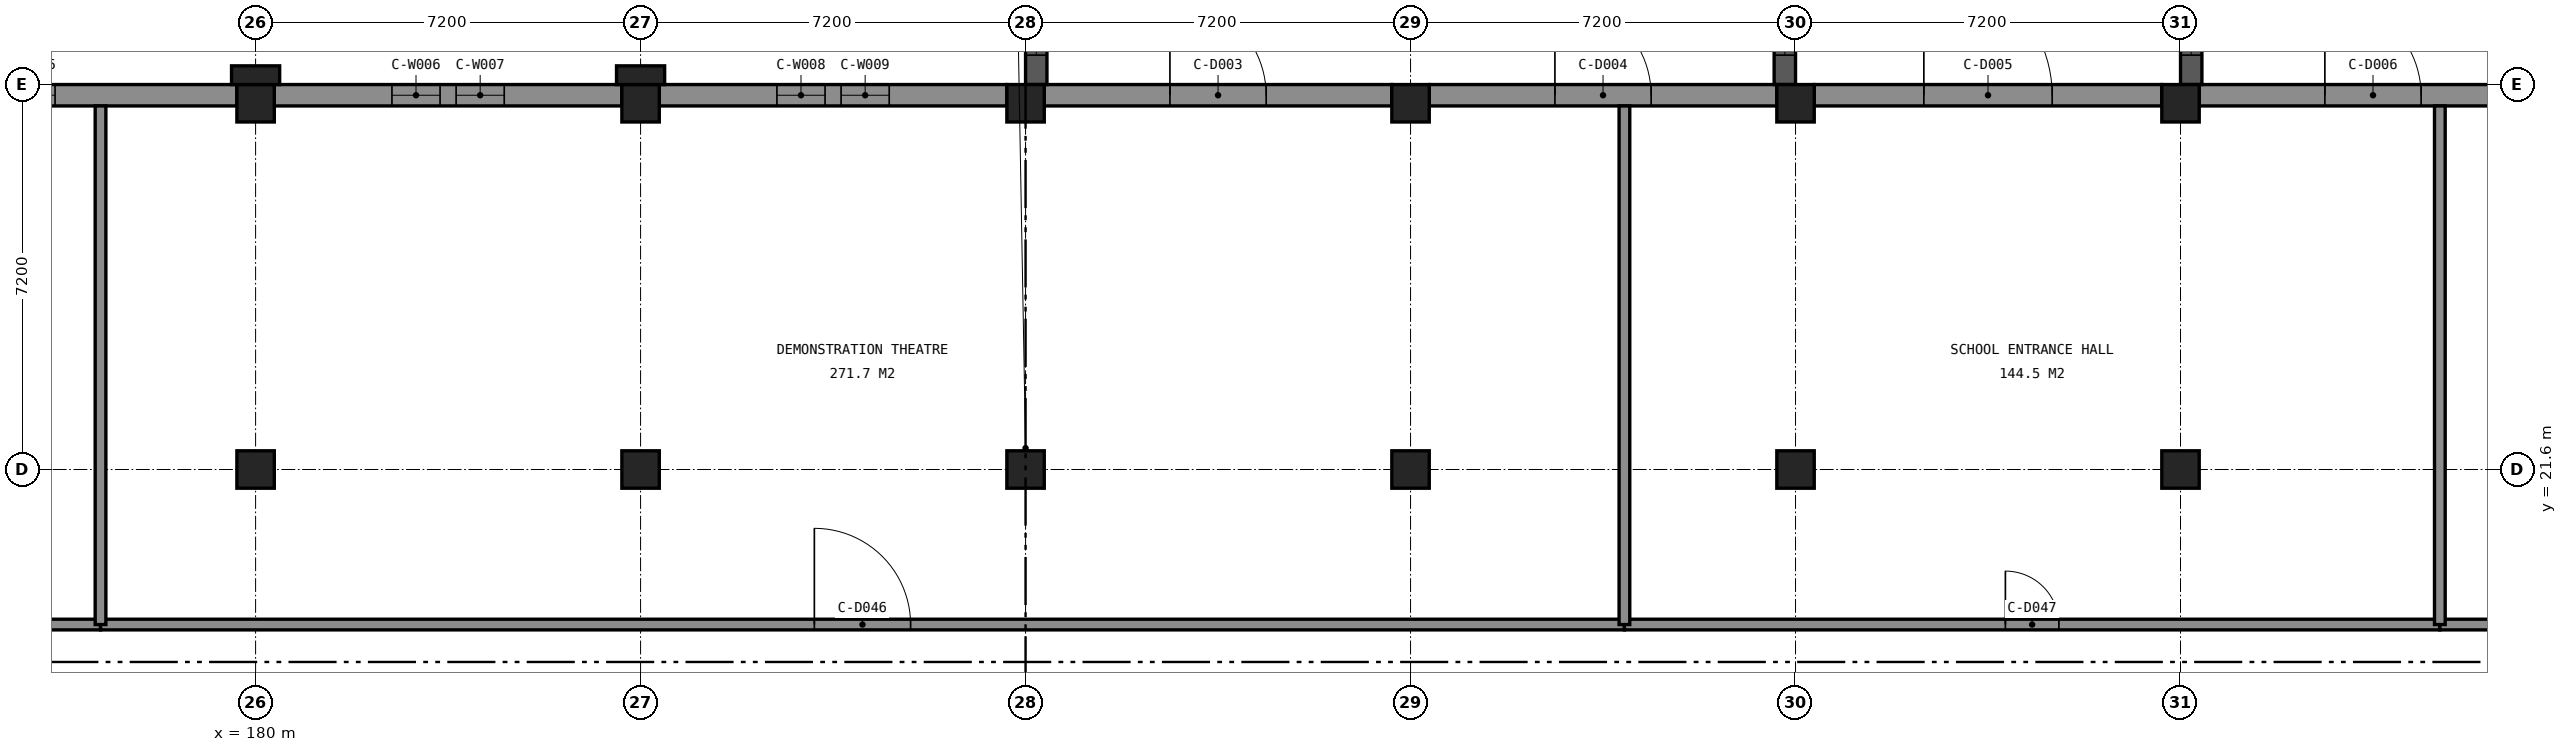
"""IFC4 building model, lengths in metres.
Left out: names, types, materials, properties, quantities, classifications, styles, units other than length and angle.
Written with IfcOpenShell. Run it as: python <this file> out.ifc"""

import sys

from ifc_helpers import new_model, si_unit, direction, frame, frame_2d, origin, origin_2d, place, context, subcontext, project, spatial, rectangle, extrude, element, fill, save


model = new_model("IFC4")
c1 = context("Model", 3, precision=1e-05, world=origin(), true_north=direction((0.0, 1.0)))
c2 = subcontext(c1, "Body", "Model", "MODEL_VIEW")
j1 = project(units=[si_unit("LENGTHUNIT", "METRE"), si_unit("PLANEANGLEUNIT", "RADIAN")], contexts=[c1])
p1 = place(None, origin())
s1 = spatial("IfcSite", under=j1, at=p1, CompositionType="ELEMENT")
p2 = place(p1, origin())
s2 = spatial("IfcBuilding", under=s1, at=p2, CompositionType="ELEMENT")
p3 = place(p2, frame((0.0, 0.0, 4.8)))
s3 = spatial("IfcBuildingStorey", under=s2, at=p3, CompositionType="ELEMENT", Elevation=4.8)
for number, where, z_axis, x_axis in (
    (1, (180.0, 28.45, 0.0), (0.0, 0.0, 1.0), (1.0, 0.0, 0.0)),
    (2, (187.2, 28.45, 0.0), (0.0, 0.0, 1.0), (1.0, 0.0, 0.0)),
    (3, (194.4, 28.45, 0.0), (0.0, 0.0, 1.0), (1.0, 0.0, 0.0)),
    (4, (201.6, 28.45, 0.0), (0.0, 0.0, 1.0), (1.0, 0.0, 0.0)),
    (5, (208.8, 28.45, 0.0), (0.0, 0.0, 1.0), (1.0, 0.0, 0.0)),
    (6, (216.0, 28.45, 0.0), (0.0, 0.0, 1.0), (1.0, 0.0, 0.0)),
    (7, (180.0, 21.6, 0.0), (0.0, 0.0, 1.0), (1.0, 0.0, 0.0)),
    (8, (187.2, 21.6, 0.0), (0.0, 0.0, 1.0), (1.0, 0.0, 0.0)),
    (9, (194.4, 21.6, 0.0), (0.0, 0.0, 1.0), (1.0, 0.0, 0.0)),
    (10, (201.6, 21.6, 0.0), (0.0, 0.0, 1.0), (1.0, 0.0, 0.0)),
    (11, (208.8, 21.6, 0.0), (0.0, 0.0, 1.0), (1.0, 0.0, 0.0)),
    (12, (216.0, 21.6, 0.0), (0.0, 0.0, 1.0), (1.0, 0.0, 0.0)),
):
    element("IfcColumn", number, at=place(p3, frame(where, z_axis=z_axis, x_axis=x_axis)), inside=s3, PredefinedType="COLUMN", context=c2, shape_type="SweptSolid", body=[
        extrude(rectangle(XDim=0.7, YDim=0.7, at=origin_2d()), origin(), (0.0, 0.0, 1.0), 4.8),
    ])
p4 = place(p3, frame((173.15, 28.6, 0.0), z_axis=(0.0, 0.0, 1.0), x_axis=(1.0, 0.0, 0.0)))
e13 = element("IfcWall", 13, at=p4, inside=s3, PredefinedType="SOLIDWALL", context=c2, shape_type="SweptSolid", body=[
    extrude(rectangle(XDim=6.5, YDim=0.4, at=frame_2d((3.25, 0.0))), origin(), (0.0, 0.0, 1.0), 3.95),
])
p5 = place(p4, frame((2.2, 0.0, 1.0)))
e14 = element("IfcOpeningElement", 14, at=p5, cuts=e13, PredefinedType="OPENING", context=c2, shape_type="SweptSolid", body=[
    extrude(rectangle(XDim=0.9, YDim=2.1, at=frame_2d((0.45, 1.05))), frame((0.0, 0.21, 0.0), z_axis=(0.0, -1.0, 0.0), x_axis=(1.0, 0.0, 0.0)), (0.0, 0.0, 1.0), 0.42),
])
p6 = place(p3, frame((180.35, 28.6, 0.0), z_axis=(0.0, 0.0, 1.0), x_axis=(1.0, 0.0, 0.0)))
e15 = element("IfcWall", 15, at=p6, inside=s3, PredefinedType="SOLIDWALL", context=c2, shape_type="SweptSolid", body=[
    extrude(rectangle(XDim=6.5, YDim=0.4, at=frame_2d((3.25, 0.0))), origin(), (0.0, 0.0, 1.0), 3.95),
])
p7 = place(p6, frame((2.2, 0.0, 1.0)))
e16 = element("IfcOpeningElement", 16, at=p7, cuts=e15, PredefinedType="OPENING", context=c2, shape_type="SweptSolid", body=[
    extrude(rectangle(XDim=0.9, YDim=2.1, at=frame_2d((0.45, 1.05))), frame((0.0, 0.21, 0.0), z_axis=(0.0, -1.0, 0.0), x_axis=(1.0, 0.0, 0.0)), (0.0, 0.0, 1.0), 0.42),
])
p8 = place(p6, frame((3.4, 0.0, 1.0)))
e17 = element("IfcOpeningElement", 17, at=p8, cuts=e15, PredefinedType="OPENING", context=c2, shape_type="SweptSolid", body=[
    extrude(rectangle(XDim=0.9, YDim=2.1, at=frame_2d((0.45, 1.05))), frame((0.0, 0.21, 0.0), z_axis=(0.0, -1.0, 0.0), x_axis=(1.0, 0.0, 0.0)), (0.0, 0.0, 1.0), 0.42),
])
p9 = place(p3, frame((187.55, 28.6, 0.0), z_axis=(0.0, 0.0, 1.0), x_axis=(1.0, 0.0, 0.0)))
e18 = element("IfcWall", 18, at=p9, inside=s3, PredefinedType="SOLIDWALL", context=c2, shape_type="SweptSolid", body=[
    extrude(rectangle(XDim=6.5, YDim=0.4, at=frame_2d((3.25, 0.0))), origin(), (0.0, 0.0, 1.0), 3.95),
])
p10 = place(p9, frame((2.2, 0.0, 1.0)))
e19 = element("IfcOpeningElement", 19, at=p10, cuts=e18, PredefinedType="OPENING", context=c2, shape_type="SweptSolid", body=[
    extrude(rectangle(XDim=0.9, YDim=2.1, at=frame_2d((0.45, 1.05))), frame((0.0, 0.21, 0.0), z_axis=(0.0, -1.0, 0.0), x_axis=(1.0, 0.0, 0.0)), (0.0, 0.0, 1.0), 0.42),
])
p11 = place(p9, frame((3.4, 0.0, 1.0)))
e20 = element("IfcOpeningElement", 20, at=p11, cuts=e18, PredefinedType="OPENING", context=c2, shape_type="SweptSolid", body=[
    extrude(rectangle(XDim=0.9, YDim=2.1, at=frame_2d((0.45, 1.05))), frame((0.0, 0.21, 0.0), z_axis=(0.0, -1.0, 0.0), x_axis=(1.0, 0.0, 0.0)), (0.0, 0.0, 1.0), 0.42),
])
p12 = place(p3, frame((194.75, 28.6, 0.0), z_axis=(0.0, 0.0, 1.0), x_axis=(1.0, 0.0, 0.0)))
e21 = element("IfcWall", 21, at=p12, inside=s3, PredefinedType="SOLIDWALL", context=c2, shape_type="SweptSolid", body=[
    extrude(rectangle(XDim=6.5, YDim=0.4, at=frame_2d((3.25, 0.0))), origin(), (0.0, 0.0, 1.0), 3.95),
])
p13 = place(p12, frame((2.35, 0.0, 0.0)))
e22 = element("IfcOpeningElement", 22, at=p13, cuts=e21, PredefinedType="OPENING", context=c2, shape_type="SweptSolid", body=[
    extrude(rectangle(XDim=1.8, YDim=2.1, at=frame_2d((0.9, 1.05))), frame((0.0, 0.21, 0.0), z_axis=(0.0, -1.0, 0.0), x_axis=(1.0, 0.0, 0.0)), (0.0, 0.0, 1.0), 0.42),
])
p14 = place(p3, frame((201.95, 28.6, 0.0), z_axis=(0.0, 0.0, 1.0), x_axis=(1.0, 0.0, 0.0)))
e23 = element("IfcWall", 23, at=p14, inside=s3, PredefinedType="SOLIDWALL", context=c2, shape_type="SweptSolid", body=[
    extrude(rectangle(XDim=6.5, YDim=0.4, at=frame_2d((3.25, 0.0))), origin(), (0.0, 0.0, 1.0), 3.95),
])
p15 = place(p14, frame((2.35, 0.0, 0.0)))
e24 = element("IfcOpeningElement", 24, at=p15, cuts=e23, PredefinedType="OPENING", context=c2, shape_type="SweptSolid", body=[
    extrude(rectangle(XDim=1.8, YDim=2.1, at=frame_2d((0.9, 1.05))), frame((0.0, 0.21, 0.0), z_axis=(0.0, -1.0, 0.0), x_axis=(1.0, 0.0, 0.0)), (0.0, 0.0, 1.0), 0.42),
])
p16 = place(p3, frame((209.15, 28.6, 0.0), z_axis=(0.0, 0.0, 1.0), x_axis=(1.0, 0.0, 0.0)))
e25 = element("IfcWall", 25, at=p16, inside=s3, PredefinedType="SOLIDWALL", context=c2, shape_type="SweptSolid", body=[
    extrude(rectangle(XDim=6.5, YDim=0.4, at=frame_2d((3.25, 0.0))), origin(), (0.0, 0.0, 1.0), 3.95),
])
p17 = place(p16, frame((2.05, 0.0, 0.0)))
e26 = element("IfcOpeningElement", 26, at=p17, cuts=e25, PredefinedType="OPENING", context=c2, shape_type="SweptSolid", body=[
    extrude(rectangle(XDim=2.4, YDim=2.7, at=frame_2d((1.2, 1.35))), frame((0.0, 0.21, 0.0), z_axis=(0.0, -1.0, 0.0), x_axis=(1.0, 0.0, 0.0)), (0.0, 0.0, 1.0), 0.42),
])
p18 = place(p3, frame((216.35, 28.6, 0.0), z_axis=(0.0, 0.0, 1.0), x_axis=(1.0, 0.0, 0.0)))
e27 = element("IfcWall", 27, at=p18, inside=s3, PredefinedType="SOLIDWALL", context=c2, shape_type="SweptSolid", body=[
    extrude(rectangle(XDim=6.5, YDim=0.4, at=frame_2d((3.25, 0.0))), origin(), (0.0, 0.0, 1.0), 3.95),
])
p19 = place(p18, frame((2.35, 0.0, 0.0)))
e28 = element("IfcOpeningElement", 28, at=p19, cuts=e27, PredefinedType="OPENING", context=c2, shape_type="SweptSolid", body=[
    extrude(rectangle(XDim=1.8, YDim=2.1, at=frame_2d((0.9, 1.05))), frame((0.0, 0.21, 0.0), z_axis=(0.0, -1.0, 0.0), x_axis=(1.0, 0.0, 0.0)), (0.0, 0.0, 1.0), 0.42),
])
for number, where, z_axis, x_axis in (
    (29, (180.0, 28.975, 0.0), (0.0, 0.0, 1.0), (1.0, 0.0, 0.0)),
    (30, (187.2, 28.975, 0.0), (0.0, 0.0, 1.0), (1.0, 0.0, 0.0)),
):
    element("IfcColumn", number, at=place(p3, frame(where, z_axis=z_axis, x_axis=x_axis)), inside=s3, PredefinedType="PILASTER", context=c2, shape_type="SweptSolid", body=[
        extrude(rectangle(XDim=0.9, YDim=0.35, at=origin_2d()), origin(), (0.0, 0.0, 1.0), 4.8),
    ])
p20 = place(p3, frame((194.6, 28.8, 0.0), z_axis=(0.0, 0.0, 1.0), x_axis=(0.0, 1.0, 0.0)))
e31 = element("IfcWall", 31, at=p20, inside=s3, PredefinedType="SOLIDWALL", context=c2, shape_type="SweptSolid", body=[
    extrude(rectangle(XDim=2.0, YDim=0.4, at=frame_2d((1.0, 0.0))), origin(), (0.0, 0.0, 1.0), 4.55),
])
p21 = place(p20, frame((0.55, 0.0, 1.0)))
e32 = element("IfcOpeningElement", 32, at=p21, cuts=e31, PredefinedType="OPENING", context=c2, shape_type="SweptSolid", body=[
    extrude(rectangle(XDim=0.9, YDim=2.1, at=frame_2d((0.45, 1.05))), frame((0.0, 0.21, 0.0), z_axis=(0.0, -1.0, 0.0), x_axis=(1.0, 0.0, 0.0)), (0.0, 0.0, 1.0), 0.42),
])
p22 = place(p3, frame((208.6, 30.8, 0.0), z_axis=(0.0, 0.0, 1.0), x_axis=(0.0, -1.0, 0.0)))
e33 = element("IfcWall", 33, at=p22, inside=s3, PredefinedType="SOLIDWALL", context=c2, shape_type="SweptSolid", body=[
    extrude(rectangle(XDim=2.0, YDim=0.4, at=frame_2d((1.0, 0.0))), origin(), (0.0, 0.0, 1.0), 4.55),
])
p23 = place(p22, frame((0.55, 0.0, 1.0)))
e34 = element("IfcOpeningElement", 34, at=p23, cuts=e33, PredefinedType="OPENING", context=c2, shape_type="SweptSolid", body=[
    extrude(rectangle(XDim=0.9, YDim=2.1, at=frame_2d((0.45, 1.05))), frame((0.0, 0.21, 0.0), z_axis=(0.0, -1.0, 0.0), x_axis=(1.0, 0.0, 0.0)), (0.0, 0.0, 1.0), 0.42),
])
p24 = place(p3, frame((216.2, 28.8, 0.0), z_axis=(0.0, 0.0, 1.0), x_axis=(0.0, 1.0, 0.0)))
e35 = element("IfcWall", 35, at=p24, inside=s3, PredefinedType="SOLIDWALL", context=c2, shape_type="SweptSolid", body=[
    extrude(rectangle(XDim=2.0, YDim=0.4, at=frame_2d((1.0, 0.0))), origin(), (0.0, 0.0, 1.0), 4.55),
])
p25 = place(p24, frame((0.55, 0.0, 1.0)))
e36 = element("IfcOpeningElement", 36, at=p25, cuts=e35, PredefinedType="OPENING", context=c2, shape_type="SweptSolid", body=[
    extrude(rectangle(XDim=0.9, YDim=2.1, at=frame_2d((0.45, 1.05))), frame((0.0, 0.21, 0.0), z_axis=(0.0, -1.0, 0.0), x_axis=(1.0, 0.0, 0.0)), (0.0, 0.0, 1.0), 0.42),
])
p26 = place(p3, frame((158.8, 18.7, 0.0), z_axis=(0.0, 0.0, 1.0), x_axis=(1.0, 0.0, 0.0)))
e37 = element("IfcWall", 37, at=p26, inside=s3, PredefinedType="PARTITIONING", context=c2, shape_type="SweptSolid", body=[
    extrude(rectangle(XDim=18.3, YDim=0.2, at=frame_2d((9.15, 0.0))), origin(), (0.0, 0.0, 1.0), 3.95),
])
p27 = place(p26, frame((8.65, 0.0, 0.0)))
e38 = element("IfcOpeningElement", 38, at=p27, cuts=e37, PredefinedType="OPENING", context=c2, shape_type="SweptSolid", body=[
    extrude(rectangle(XDim=1.0, YDim=2.1, at=frame_2d((0.5, 1.05))), frame((0.0, 0.11, 0.0), z_axis=(0.0, -1.0, 0.0), x_axis=(1.0, 0.0, 0.0)), (0.0, 0.0, 1.0), 0.22),
])
p28 = place(p3, frame((177.1, 18.7, 0.0), z_axis=(0.0, 0.0, 1.0), x_axis=(1.0, 0.0, 0.0)))
e39 = element("IfcWall", 39, at=p28, inside=s3, PredefinedType="PARTITIONING", context=c2, shape_type="SweptSolid", body=[
    extrude(rectangle(XDim=28.5, YDim=0.2, at=frame_2d((14.25, 0.0))), origin(), (0.0, 0.0, 1.0), 3.95),
])
p29 = place(p28, frame((13.35, 0.0, 0.0)))
e40 = element("IfcOpeningElement", 40, at=p29, cuts=e39, PredefinedType="OPENING", context=c2, shape_type="SweptSolid", body=[
    extrude(rectangle(XDim=1.8, YDim=2.1, at=frame_2d((0.9, 1.05))), frame((0.0, 0.11, 0.0), z_axis=(0.0, -1.0, 0.0), x_axis=(1.0, 0.0, 0.0)), (0.0, 0.0, 1.0), 0.22),
])
p30 = place(p3, frame((205.6, 18.7, 0.0), z_axis=(0.0, 0.0, 1.0), x_axis=(1.0, 0.0, 0.0)))
e41 = element("IfcWall", 41, at=p30, inside=s3, PredefinedType="PARTITIONING", context=c2, shape_type="SweptSolid", body=[
    extrude(rectangle(XDim=15.25, YDim=0.2, at=frame_2d((7.625, 0.0))), origin(), (0.0, 0.0, 1.0), 3.95),
])
p31 = place(p30, frame((7.125, 0.0, 0.0)))
e42 = element("IfcOpeningElement", 42, at=p31, cuts=e41, PredefinedType="OPENING", context=c2, shape_type="SweptSolid", body=[
    extrude(rectangle(XDim=1.0, YDim=2.1, at=frame_2d((0.5, 1.05))), frame((0.0, 0.11, 0.0), z_axis=(0.0, -1.0, 0.0), x_axis=(1.0, 0.0, 0.0)), (0.0, 0.0, 1.0), 0.22),
])
p32 = place(p3, frame((220.85, 18.7, 0.0), z_axis=(0.0, 0.0, 1.0), x_axis=(1.0, 0.0, 0.0)))
e43 = element("IfcWall", 43, at=p32, inside=s3, PredefinedType="PARTITIONING", context=c2, shape_type="SweptSolid", body=[
    extrude(rectangle(XDim=9.15, YDim=0.2, at=frame_2d((4.575, 0.0))), origin(), (0.0, 0.0, 1.0), 3.95),
])
p33 = place(p32, frame((4.075, 0.0, 0.0)))
e44 = element("IfcOpeningElement", 44, at=p33, cuts=e43, PredefinedType="OPENING", context=c2, shape_type="SweptSolid", body=[
    extrude(rectangle(XDim=1.0, YDim=2.1, at=frame_2d((0.5, 1.05))), frame((0.0, 0.11, 0.0), z_axis=(0.0, -1.0, 0.0), x_axis=(1.0, 0.0, 0.0)), (0.0, 0.0, 1.0), 0.22),
])
for number, where, z_axis, x_axis in (
    (45, (177.1, 28.4, 0.0), (0.0, 0.0, 1.0), (0.0, -1.0, 0.0)),
    (46, (205.6, 28.4, 0.0), (0.0, 0.0, 1.0), (0.0, -1.0, 0.0)),
    (47, (220.85, 28.4, 0.0), (0.0, 0.0, 1.0), (0.0, -1.0, 0.0)),
):
    element("IfcWall", number, at=place(p3, frame(where, z_axis=z_axis, x_axis=x_axis)), inside=s3, PredefinedType="PARTITIONING", context=c2, shape_type="SweptSolid", body=[
        extrude(rectangle(XDim=9.7, YDim=0.2, at=frame_2d((4.85, 0.0))), origin(), (0.0, 0.0, 1.0), 3.95),
    ])
p34 = place(p5, origin())
e48 = element("IfcWindow", 48, at=p34, inside=s3, PartitioningType="SINGLE_PANEL", PredefinedType="WINDOW", context=c2, shape_type="SweptSolid", body=[
    extrude(rectangle(XDim=0.9, YDim=2.1, at=frame_2d((0.45, 1.05))), frame((0.0, -0.09, 0.0), z_axis=(0.0, -1.0, 0.0), x_axis=(1.0, 0.0, 0.0)), (0.0, 0.0, 1.0), 0.06),
])
fill(e14, e48)
p35 = place(p7, origin())
e49 = element("IfcWindow", 49, at=p35, inside=s3, PartitioningType="SINGLE_PANEL", PredefinedType="WINDOW", context=c2, shape_type="SweptSolid", body=[
    extrude(rectangle(XDim=0.9, YDim=2.1, at=frame_2d((0.45, 1.05))), frame((0.0, -0.09, 0.0), z_axis=(0.0, -1.0, 0.0), x_axis=(1.0, 0.0, 0.0)), (0.0, 0.0, 1.0), 0.06),
])
fill(e16, e49)
p36 = place(p8, origin())
e50 = element("IfcWindow", 50, at=p36, inside=s3, PartitioningType="SINGLE_PANEL", PredefinedType="WINDOW", context=c2, shape_type="SweptSolid", body=[
    extrude(rectangle(XDim=0.9, YDim=2.1, at=frame_2d((0.45, 1.05))), frame((0.0, -0.09, 0.0), z_axis=(0.0, -1.0, 0.0), x_axis=(1.0, 0.0, 0.0)), (0.0, 0.0, 1.0), 0.06),
])
fill(e17, e50)
p37 = place(p10, origin())
e51 = element("IfcWindow", 51, at=p37, inside=s3, PartitioningType="SINGLE_PANEL", PredefinedType="WINDOW", context=c2, shape_type="SweptSolid", body=[
    extrude(rectangle(XDim=0.9, YDim=2.1, at=frame_2d((0.45, 1.05))), frame((0.0, -0.09, 0.0), z_axis=(0.0, -1.0, 0.0), x_axis=(1.0, 0.0, 0.0)), (0.0, 0.0, 1.0), 0.06),
])
fill(e19, e51)
p38 = place(p11, origin())
e52 = element("IfcWindow", 52, at=p38, inside=s3, PartitioningType="SINGLE_PANEL", PredefinedType="WINDOW", context=c2, shape_type="SweptSolid", body=[
    extrude(rectangle(XDim=0.9, YDim=2.1, at=frame_2d((0.45, 1.05))), frame((0.0, -0.09, 0.0), z_axis=(0.0, -1.0, 0.0), x_axis=(1.0, 0.0, 0.0)), (0.0, 0.0, 1.0), 0.06),
])
fill(e20, e52)
p39 = place(p13, origin())
e53 = element("IfcDoor", 53, at=p39, inside=s3, OperationType="NOTDEFINED", PredefinedType="DOOR", context=c2, shape_type="SweptSolid", body=[
    extrude(rectangle(XDim=1.8, YDim=2.1, at=frame_2d((0.9, 1.05))), frame((0.0, 0.025, 0.0), z_axis=(0.0, -1.0, 0.0), x_axis=(1.0, 0.0, 0.0)), (0.0, 0.0, 1.0), 0.05),
])
fill(e22, e53)
p40 = place(p15, origin())
e54 = element("IfcDoor", 54, at=p40, inside=s3, OperationType="NOTDEFINED", PredefinedType="DOOR", context=c2, shape_type="SweptSolid", body=[
    extrude(rectangle(XDim=1.8, YDim=2.1, at=frame_2d((0.9, 1.05))), frame((0.0, 0.025, 0.0), z_axis=(0.0, -1.0, 0.0), x_axis=(1.0, 0.0, 0.0)), (0.0, 0.0, 1.0), 0.05),
])
fill(e24, e54)
p41 = place(p17, origin())
e55 = element("IfcDoor", 55, at=p41, inside=s3, OperationType="NOTDEFINED", PredefinedType="DOOR", context=c2, shape_type="SweptSolid", body=[
    extrude(rectangle(XDim=2.4, YDim=2.7, at=frame_2d((1.2, 1.35))), frame((0.0, 0.025, 0.0), z_axis=(0.0, -1.0, 0.0), x_axis=(1.0, 0.0, 0.0)), (0.0, 0.0, 1.0), 0.05),
])
fill(e26, e55)
p42 = place(p19, origin())
e56 = element("IfcDoor", 56, at=p42, inside=s3, OperationType="NOTDEFINED", PredefinedType="DOOR", context=c2, shape_type="SweptSolid", body=[
    extrude(rectangle(XDim=1.8, YDim=2.1, at=frame_2d((0.9, 1.05))), frame((0.0, 0.025, 0.0), z_axis=(0.0, -1.0, 0.0), x_axis=(1.0, 0.0, 0.0)), (0.0, 0.0, 1.0), 0.05),
])
fill(e28, e56)
p43 = place(p21, origin())
e57 = element("IfcWindow", 57, at=p43, inside=s3, PartitioningType="SINGLE_PANEL", PredefinedType="WINDOW", context=c2, shape_type="SweptSolid", body=[
    extrude(rectangle(XDim=0.9, YDim=2.1, at=frame_2d((0.45, 1.05))), frame((0.0, -0.09, 0.0), z_axis=(0.0, -1.0, 0.0), x_axis=(1.0, 0.0, 0.0)), (0.0, 0.0, 1.0), 0.06),
])
fill(e32, e57)
p44 = place(p23, origin())
e58 = element("IfcWindow", 58, at=p44, inside=s3, PartitioningType="SINGLE_PANEL", PredefinedType="WINDOW", context=c2, shape_type="SweptSolid", body=[
    extrude(rectangle(XDim=0.9, YDim=2.1, at=frame_2d((0.45, 1.05))), frame((0.0, -0.09, 0.0), z_axis=(0.0, -1.0, 0.0), x_axis=(1.0, 0.0, 0.0)), (0.0, 0.0, 1.0), 0.06),
])
fill(e34, e58)
p45 = place(p25, origin())
e59 = element("IfcWindow", 59, at=p45, inside=s3, PartitioningType="SINGLE_PANEL", PredefinedType="WINDOW", context=c2, shape_type="SweptSolid", body=[
    extrude(rectangle(XDim=0.9, YDim=2.1, at=frame_2d((0.45, 1.05))), frame((0.0, -0.09, 0.0), z_axis=(0.0, -1.0, 0.0), x_axis=(1.0, 0.0, 0.0)), (0.0, 0.0, 1.0), 0.06),
])
fill(e36, e59)
p46 = place(p29, origin())
e60 = element("IfcDoor", 60, at=p46, inside=s3, OperationType="NOTDEFINED", PredefinedType="DOOR", context=c2, shape_type="SweptSolid", body=[
    extrude(rectangle(XDim=1.8, YDim=2.1, at=frame_2d((0.9, 1.05))), frame((0.0, 0.025, 0.0), z_axis=(0.0, -1.0, 0.0), x_axis=(1.0, 0.0, 0.0)), (0.0, 0.0, 1.0), 0.05),
])
fill(e40, e60)
p47 = place(p31, origin())
e61 = element("IfcDoor", 61, at=p47, inside=s3, OperationType="NOTDEFINED", PredefinedType="DOOR", context=c2, shape_type="SweptSolid", body=[
    extrude(rectangle(XDim=1.0, YDim=2.1, at=frame_2d((0.5, 1.05))), frame((0.0, 0.025, 0.0), z_axis=(0.0, -1.0, 0.0), x_axis=(1.0, 0.0, 0.0)), (0.0, 0.0, 1.0), 0.05),
])
fill(e42, e61)
save(model, sys.argv[1])
